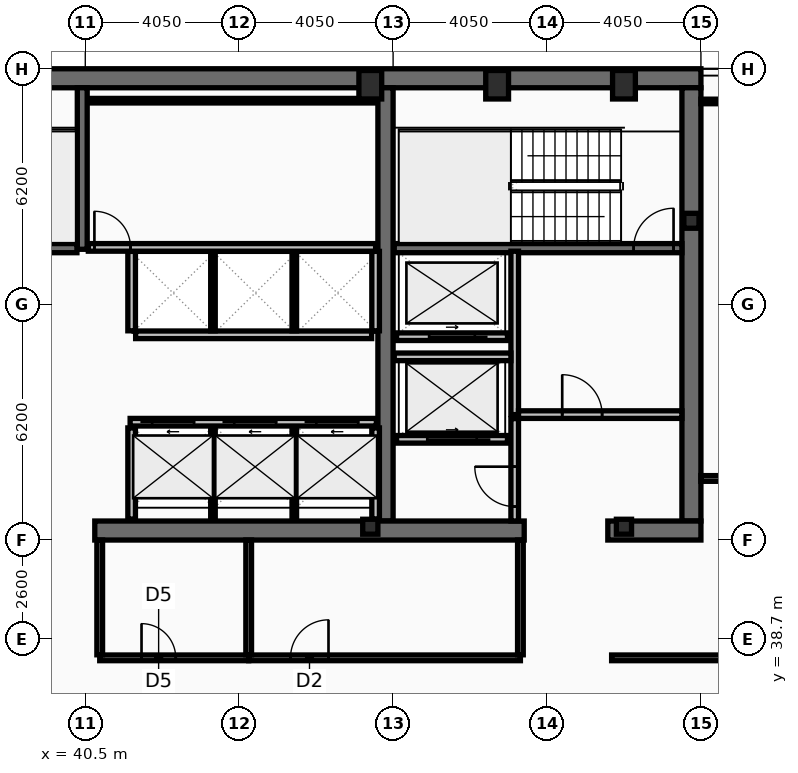
"""IFC4 building model, lengths in metres.
Left out: names, types, materials, properties, quantities, classifications, styles, units other than length and angle.
Written with IfcOpenShell. Run it as: python <this file> out.ifc"""

import sys

from ifc_helpers import new_model, si_unit, direction, frame, frame_2d, origin, origin_2d, place, context, subcontext, project, spatial, rectangle, hollow_rectangle, i_section, extrude, element, fill, save


model = new_model("IFC4")
c1 = context("Model", 3, precision=1e-05, world=origin(), true_north=direction((0.0, 1.0)))
c2 = subcontext(c1, "Body", "Model", "MODEL_VIEW")
j1 = project(units=[si_unit("LENGTHUNIT", "METRE"), si_unit("PLANEANGLEUNIT", "RADIAN")], contexts=[c1])
p1 = place(None, origin())
s1 = spatial("IfcSite", under=j1, at=p1, CompositionType="ELEMENT")
p2 = place(p1, origin())
s2 = spatial("IfcBuilding", under=s1, at=p2, CompositionType="ELEMENT")
p3 = place(p2, frame((0.0, 0.0, 269.8)))
s3 = spatial("IfcBuildingStorey", under=s2, at=p3, CompositionType="ELEMENT", Elevation=269.8)
p4 = place(p3, frame((16.2, 53.45, 0.0), z_axis=(0.0, 0.0, 1.0), x_axis=(1.0, 0.0, 0.0)))
e1 = element("IfcWall", 1, at=p4, inside=s3, PredefinedType="SHEAR", context=c2, shape_type="SweptSolid", body=[
    extrude(rectangle(XDim=40.5, YDim=0.5, at=frame_2d((20.25, 0.0))), origin(), (0.0, 0.0, 1.0), 3.44),
])
p5 = place(p3, frame((56.45, 53.2, 0.0), z_axis=(0.0, 0.0, 1.0), x_axis=(0.0, -1.0, 0.0)))
e2 = element("IfcWall", 2, at=p5, inside=s3, PredefinedType="SHEAR", context=c2, shape_type="SweptSolid", body=[
    extrude(rectangle(XDim=11.4, YDim=0.5, at=frame_2d((5.7, 0.0))), origin(), (0.0, 0.0, 1.0), 3.44),
])
p6 = place(p3, frame((48.4, 41.8, 0.0), z_axis=(0.0, 0.0, 1.0), x_axis=(0.0, 1.0, 0.0)))
e3 = element("IfcWall", 3, at=p6, inside=s3, PredefinedType="SHEAR", context=c2, shape_type="SweptSolid", body=[
    extrude(rectangle(XDim=11.4, YDim=0.4, at=frame_2d((5.7, 0.0))), origin(), (0.0, 0.0, 1.0), 3.44),
])
p7 = place(p3, frame((52.05, 41.55, 0.0), z_axis=(0.0, 0.0, 1.0), x_axis=(-1.0, 0.0, 0.0)))
e4 = element("IfcWall", 4, at=p7, inside=s3, PredefinedType="SHEAR", context=c2, shape_type="SweptSolid", body=[
    extrude(rectangle(XDim=11.3, YDim=0.5, at=frame_2d((5.65, 0.0))), origin(), (0.0, 0.0, 1.0), 3.44),
])
p8 = place(p3, frame((56.7, 41.55, 0.0), z_axis=(0.0, 0.0, 1.0), x_axis=(-1.0, 0.0, 0.0)))
e5 = element("IfcWall", 5, at=p8, inside=s3, PredefinedType="SHEAR", context=c2, shape_type="SweptSolid", body=[
    extrude(rectangle(XDim=2.45, YDim=0.5, at=frame_2d((1.225, 0.0))), origin(), (0.0, 0.0, 1.0), 3.44),
])
p9 = place(p3, frame((40.42, 48.95, 0.0), z_axis=(0.0, 0.0, 1.0), x_axis=(0.0, 1.0, 0.0)))
e6 = element("IfcWall", 6, at=p9, inside=s3, PredefinedType="SHEAR", context=c2, shape_type="SweptSolid", body=[
    extrude(rectangle(XDim=4.25, YDim=0.26, at=frame_2d((2.125, 0.0))), origin(), (0.0, 0.0, 1.0), 3.44),
])
p10 = place(p3, frame((48.63, 48.98, 0.0), z_axis=(0.0, 0.0, 1.0), x_axis=(1.0, 0.0, 0.0)))
e7 = element("IfcWall", 7, at=p10, inside=s3, PredefinedType="SHEAR", context=c2, shape_type="SweptSolid", body=[
    extrude(rectangle(XDim=7.57, YDim=0.24, at=frame_2d((3.785, 0.0))), origin(), (0.0, 0.0, 1.0), 3.44),
])
p11 = place(p10, frame((6.3, 0.0, 0.0)))
e8 = element("IfcOpeningElement", 8, at=p11, cuts=e7, PredefinedType="OPENING", context=c2, shape_type="SweptSolid", body=[
    extrude(rectangle(XDim=1.05, YDim=2.15, at=frame_2d((0.525, 1.075))), frame((0.0, 0.13, 0.0), z_axis=(0.0, -1.0, 0.0), x_axis=(1.0, 0.0, 0.0)), (0.0, 0.0, 1.0), 0.26),
])
p12 = place(p3, frame((32.72, 48.98, 0.0), z_axis=(0.0, 0.0, 1.0), x_axis=(1.0, 0.0, 0.0)))
e9 = element("IfcWall", 9, at=p12, inside=s3, PredefinedType="SHEAR", context=c2, shape_type="SweptSolid", body=[
    extrude(rectangle(XDim=7.56, YDim=0.24, at=frame_2d((3.78, 0.0))), origin(), (0.0, 0.0, 1.0), 3.44),
])
p13 = place(p12, frame((0.22, 0.0, 0.0)))
e10 = element("IfcOpeningElement", 10, at=p13, cuts=e9, PredefinedType="OPENING", context=c2, shape_type="SweptSolid", body=[
    extrude(rectangle(XDim=1.05, YDim=2.15, at=frame_2d((0.525, 1.075))), frame((0.0, 0.13, 0.0), z_axis=(0.0, -1.0, 0.0), x_axis=(1.0, 0.0, 0.0)), (0.0, 0.0, 1.0), 0.26),
])
for number, where, z_axis, x_axis in (
    (11, (48.0, 53.28, 0.0), (0.0, 0.0, 1.0), (1.0, 0.0, 0.0)),
    (12, (51.337, 53.28, 0.0), (0.0, 0.0, 1.0), (1.0, 0.0, 0.0)),
    (13, (54.675, 53.28, 0.0), (0.0, 0.0, 1.0), (1.0, 0.0, 0.0)),
):
    element("IfcColumn", number, at=place(p3, frame(where, z_axis=z_axis, x_axis=x_axis)), inside=s3, PredefinedType="COLUMN", context=c2, shape_type="SweptSolid", body=[
        extrude(hollow_rectangle(XDim=0.6, YDim=0.75, WallThickness=0.045, at=origin_2d()), origin(), (0.0, 0.0, 1.0), 3.6),
    ])
for number, where, z_axis, x_axis in (
    (14, (56.45, 49.7, 0.0), (0.0, 0.0, 1.0), (1.0, 0.0, 0.0)),
    (15, (48.0, 41.65, 0.0), (0.0, 0.0, 1.0), (1.0, 0.0, 0.0)),
    (16, (54.675, 41.65, 0.0), (0.0, 0.0, 1.0), (1.0, 0.0, 0.0)),
):
    element("IfcColumn", number, at=place(p3, frame(where, z_axis=z_axis, x_axis=x_axis)), inside=s3, PredefinedType="COLUMN", context=c2, shape_type="SweptSolid", body=[
        extrude(i_section(OverallWidth=0.399, OverallDepth=0.393, WebThickness=0.023, FlangeThickness=0.037, at=origin_2d()), origin(), (0.0, 0.0, 1.0), 3.6),
    ])
p14 = place(p3, frame((41.68, 44.4, 0.0), z_axis=(0.0, 0.0, 1.0), x_axis=(1.0, 0.0, 0.0)))
e17 = element("IfcWall", 17, at=p14, inside=s3, PredefinedType="PARTITIONING", context=c2, shape_type="SweptSolid", body=[
    extrude(rectangle(XDim=6.48, YDim=0.2, at=frame_2d((3.24, 0.0))), origin(), (0.0, 0.0, 1.0), 3.44),
])
p15 = place(p14, frame((0.58, 0.0, 0.0)))
e18 = element("IfcOpeningElement", 18, at=p15, cuts=e17, PredefinedType="OPENING", context=c2, shape_type="SweptSolid", body=[
    extrude(rectangle(XDim=1.1, YDim=2.18, at=frame_2d((0.55, 1.09))), frame((0.0, 0.11, 0.0), z_axis=(0.0, -1.0, 0.0), x_axis=(1.0, 0.0, 0.0)), (0.0, 0.0, 1.0), 0.22),
])
p16 = place(p14, frame((2.74, 0.0, 0.0)))
e19 = element("IfcOpeningElement", 19, at=p16, cuts=e17, PredefinedType="OPENING", context=c2, shape_type="SweptSolid", body=[
    extrude(rectangle(XDim=1.1, YDim=2.18, at=frame_2d((0.55, 1.09))), frame((0.0, 0.11, 0.0), z_axis=(0.0, -1.0, 0.0), x_axis=(1.0, 0.0, 0.0)), (0.0, 0.0, 1.0), 0.22),
])
p17 = place(p14, frame((4.9, 0.0, 0.0)))
e20 = element("IfcOpeningElement", 20, at=p17, cuts=e17, PredefinedType="OPENING", context=c2, shape_type="SweptSolid", body=[
    extrude(rectangle(XDim=1.1, YDim=2.18, at=frame_2d((0.55, 1.09))), frame((0.0, 0.11, 0.0), z_axis=(0.0, -1.0, 0.0), x_axis=(1.0, 0.0, 0.0)), (0.0, 0.0, 1.0), 0.22),
])
p18 = place(p3, frame((51.61, 43.95, 0.0), z_axis=(0.0, 0.0, 1.0), x_axis=(-1.0, 0.0, 0.0)))
e21 = element("IfcWall", 21, at=p18, inside=s3, PredefinedType="PARTITIONING", context=c2, shape_type="SweptSolid", body=[
    extrude(rectangle(XDim=2.92, YDim=0.2, at=frame_2d((1.46, 0.0))), origin(), (0.0, 0.0, 1.0), 3.44),
])
p19 = place(p18, frame((0.81, 0.0, 0.0)))
e22 = element("IfcOpeningElement", 22, at=p19, cuts=e21, PredefinedType="OPENING", context=c2, shape_type="SweptSolid", body=[
    extrude(rectangle(XDim=1.3, YDim=2.18, at=frame_2d((0.65, 1.09))), frame((0.0, 0.11, 0.0), z_axis=(0.0, -1.0, 0.0), x_axis=(1.0, 0.0, 0.0)), (0.0, 0.0, 1.0), 0.22),
])
p20 = place(p3, frame((51.61, 46.65, 0.0), z_axis=(0.0, 0.0, 1.0), x_axis=(-1.0, 0.0, 0.0)))
e23 = element("IfcWall", 23, at=p20, inside=s3, PredefinedType="PARTITIONING", context=c2, shape_type="SweptSolid", body=[
    extrude(rectangle(XDim=2.92, YDim=0.2, at=frame_2d((1.46, 0.0))), origin(), (0.0, 0.0, 1.0), 3.44),
])
p21 = place(p20, frame((0.86, 0.0, 0.0)))
e24 = element("IfcOpeningElement", 24, at=p21, cuts=e23, PredefinedType="OPENING", context=c2, shape_type="SweptSolid", body=[
    extrude(rectangle(XDim=1.2, YDim=2.18, at=frame_2d((0.6, 1.09))), frame((0.0, 0.11, 0.0), z_axis=(0.0, -1.0, 0.0), x_axis=(1.0, 0.0, 0.0)), (0.0, 0.0, 1.0), 0.22),
])
p22 = place(p3, frame((51.8, 44.6, 0.0), z_axis=(0.0, 0.0, 1.0), x_axis=(0.0, 1.0, 0.0)))
e25 = element("IfcWall", 25, at=p22, inside=s3, PredefinedType="PARTITIONING", context=c2, shape_type="SweptSolid", body=[
    extrude(rectangle(XDim=4.3, YDim=0.2, at=frame_2d((2.15, 0.0))), origin(), (0.0, 0.0, 1.0), 3.44),
])
p23 = place(p3, frame((51.9, 44.6, 0.0), z_axis=(0.0, 0.0, 1.0), x_axis=(1.0, 0.0, 0.0)))
e26 = element("IfcWall", 26, at=p23, inside=s3, PredefinedType="PARTITIONING", context=c2, shape_type="SweptSolid", body=[
    extrude(rectangle(XDim=4.3, YDim=0.2, at=frame_2d((2.15, 0.0))), origin(), (0.0, 0.0, 1.0), 3.44),
])
p24 = place(p23, frame((1.15, 0.0, 0.0)))
e27 = element("IfcOpeningElement", 27, at=p24, cuts=e26, PredefinedType="OPENING", context=c2, shape_type="SweptSolid", body=[
    extrude(rectangle(XDim=1.05, YDim=2.15, at=frame_2d((0.525, 1.075))), frame((0.0, 0.11, 0.0), z_axis=(0.0, -1.0, 0.0), x_axis=(1.0, 0.0, 0.0)), (0.0, 0.0, 1.0), 0.22),
])
p25 = place(p3, frame((48.63, 46.12, 0.0), z_axis=(0.0, 0.0, 1.0), x_axis=(1.0, 0.0, 0.0)))
e28 = element("IfcWall", 28, at=p25, inside=s3, PredefinedType="PARTITIONING", context=c2, shape_type="SweptSolid", body=[
    extrude(rectangle(XDim=3.07, YDim=0.2, at=frame_2d((1.535, 0.0))), origin(), (0.0, 0.0, 1.0), 3.44),
])
p26 = place(p3, frame((51.8, 41.8, 0.0), z_axis=(0.0, 0.0, 1.0), x_axis=(0.0, 1.0, 0.0)))
e29 = element("IfcWall", 29, at=p26, inside=s3, PredefinedType="PARTITIONING", context=c2, shape_type="SweptSolid", body=[
    extrude(rectangle(XDim=2.695, YDim=0.2, at=frame_2d((1.348, 0.0))), origin(), (0.0, 0.0, 1.0), 3.44),
])
p27 = place(p26, frame((0.38, 0.0, 0.0)))
e30 = element("IfcOpeningElement", 30, at=p27, cuts=e29, PredefinedType="OPENING", context=c2, shape_type="SweptSolid", body=[
    extrude(rectangle(XDim=1.05, YDim=2.15, at=frame_2d((0.525, 1.075))), frame((0.0, 0.11, 0.0), z_axis=(0.0, -1.0, 0.0), x_axis=(1.0, 0.0, 0.0)), (0.0, 0.0, 1.0), 0.22),
])
p28 = place(p3, frame((41.825, 46.7, 0.0), z_axis=(0.0, 0.0, 1.0), x_axis=(1.0, 0.0, 0.0)))
e31 = element("IfcWall", 31, at=p28, inside=s3, PredefinedType="PARTITIONING", context=c2, shape_type="SweptSolid", body=[
    extrude(rectangle(XDim=6.21, YDim=0.2, at=frame_2d((3.105, 0.0))), origin(), (0.0, 0.0, 1.0), 3.44),
])
for number, where, z_axis, x_axis in (
    (32, (41.72, 46.805, 0.0), (0.0, 0.0, 1.0), (0.0, 1.0, 0.0)),
    (33, (48.14, 46.805, 0.0), (0.0, 0.0, 1.0), (0.0, 1.0, 0.0)),
):
    element("IfcWall", number, at=place(p3, frame(where, z_axis=z_axis, x_axis=x_axis)), inside=s3, PredefinedType="PARTITIONING", context=c2, shape_type="SweptSolid", body=[
        extrude(rectangle(XDim=2.09, YDim=0.2, at=frame_2d((1.045, 0.0))), origin(), (0.0, 0.0, 1.0), 3.44),
    ])
for number, where, z_axis, x_axis in (
    (34, (43.86, 46.805, 0.0), (0.0, 0.0, 1.0), (0.0, 1.0, 0.0)),
    (35, (46.0, 46.805, 0.0), (0.0, 0.0, 1.0), (0.0, 1.0, 0.0)),
):
    element("IfcWall", number, at=place(p3, frame(where, z_axis=z_axis, x_axis=x_axis)), inside=s3, PredefinedType="PARTITIONING", context=c2, shape_type="SweptSolid", body=[
        extrude(rectangle(XDim=2.09, YDim=0.12, at=frame_2d((1.045, 0.0))), origin(), (0.0, 0.0, 1.0), 3.44),
    ])
for number, where, z_axis, x_axis in (
    (36, (41.72, 41.85, 0.0), (0.0, 0.0, 1.0), (0.0, 1.0, 0.0)),
    (37, (48.14, 41.85, 0.0), (0.0, 0.0, 1.0), (0.0, 1.0, 0.0)),
):
    element("IfcWall", number, at=place(p3, frame(where, z_axis=z_axis, x_axis=x_axis)), inside=s3, PredefinedType="PARTITIONING", context=c2, shape_type="SweptSolid", body=[
        extrude(rectangle(XDim=2.4, YDim=0.2, at=frame_2d((1.2, 0.0))), origin(), (0.0, 0.0, 1.0), 3.44),
    ])
for number, where, z_axis, x_axis in (
    (38, (43.86, 41.85, 0.0), (0.0, 0.0, 1.0), (0.0, 1.0, 0.0)),
    (39, (46.0, 41.85, 0.0), (0.0, 0.0, 1.0), (0.0, 1.0, 0.0)),
):
    element("IfcWall", number, at=place(p3, frame(where, z_axis=z_axis, x_axis=x_axis)), inside=s3, PredefinedType="PARTITIONING", context=c2, shape_type="SweptSolid", body=[
        extrude(rectangle(XDim=2.4, YDim=0.12, at=frame_2d((1.2, 0.0))), origin(), (0.0, 0.0, 1.0), 3.44),
    ])
p29 = place(p3, frame((40.58, 52.86, 0.0), z_axis=(0.0, 0.0, 1.0), x_axis=(1.0, 0.0, 0.0)))
e40 = element("IfcWall", 40, at=p29, inside=s3, PredefinedType="PARTITIONING", context=c2, shape_type="SweptSolid", body=[
    extrude(rectangle(XDim=7.56, YDim=0.12, at=frame_2d((3.78, 0.0))), origin(), (0.0, 0.0, 1.0), 3.44),
])
p30 = place(p3, frame((40.58, 49.0, 0.0), z_axis=(0.0, 0.0, 1.0), x_axis=(1.0, 0.0, 0.0)))
e41 = element("IfcWall", 41, at=p30, inside=s3, PredefinedType="PARTITIONING", context=c2, shape_type="SweptSolid", body=[
    extrude(rectangle(XDim=7.56, YDim=0.2, at=frame_2d((3.78, 0.0))), origin(), (0.0, 0.0, 1.0), 3.44),
])
p31 = place(p30, frame((0.16, 0.0, 0.0)))
e42 = element("IfcOpeningElement", 42, at=p31, cuts=e41, PredefinedType="OPENING", context=c2, shape_type="SweptSolid", body=[
    extrude(rectangle(XDim=0.95, YDim=2.1, at=frame_2d((0.475, 1.05))), frame((0.0, 0.11, 0.0), z_axis=(0.0, -1.0, 0.0), x_axis=(1.0, 0.0, 0.0)), (0.0, 0.0, 1.0), 0.22),
])
p32 = place(p3, frame((40.88, 38.2, 0.0), z_axis=(0.0, 0.0, 1.0), x_axis=(1.0, 0.0, 0.0)))
e43 = element("IfcWall", 43, at=p32, inside=s3, PredefinedType="PARTITIONING", context=c2, shape_type="SweptSolid", body=[
    extrude(rectangle(XDim=3.92, YDim=0.15, at=frame_2d((1.96, 0.0))), origin(), (0.0, 0.0, 1.0), 2.78),
])
p33 = place(p32, frame((1.1, 0.0, 0.0)))
e44 = element("IfcOpeningElement", 44, at=p33, cuts=e43, PredefinedType="OPENING", context=c2, shape_type="SweptSolid", body=[
    extrude(rectangle(XDim=0.9, YDim=2.05, at=frame_2d((0.45, 1.025))), frame((0.0, 0.085, 0.0), z_axis=(0.0, -1.0, 0.0), x_axis=(1.0, 0.0, 0.0)), (0.0, 0.0, 1.0), 0.17),
])
p34 = place(p3, frame((44.8, 38.2, 0.0), z_axis=(0.0, 0.0, 1.0), x_axis=(1.0, 0.0, 0.0)))
e45 = element("IfcWall", 45, at=p34, inside=s3, PredefinedType="PARTITIONING", context=c2, shape_type="SweptSolid", body=[
    extrude(rectangle(XDim=7.15, YDim=0.15, at=frame_2d((3.575, 0.0))), origin(), (0.0, 0.0, 1.0), 2.78),
])
p35 = place(p34, frame((1.1, 0.0, 0.0)))
e46 = element("IfcOpeningElement", 46, at=p35, cuts=e45, PredefinedType="OPENING", context=c2, shape_type="SweptSolid", body=[
    extrude(rectangle(XDim=1.0, YDim=2.05, at=frame_2d((0.5, 1.025))), frame((0.0, 0.085, 0.0), z_axis=(0.0, -1.0, 0.0), x_axis=(1.0, 0.0, 0.0)), (0.0, 0.0, 1.0), 0.17),
])
for number, where, z_axis, x_axis in (
    (47, (40.88, 38.28, 0.0), (0.0, 0.0, 1.0), (0.0, 1.0, 0.0)),
    (48, (44.8, 38.28, 0.0), (0.0, 0.0, 1.0), (0.0, 1.0, 0.0)),
    (49, (51.95, 38.28, 0.0), (0.0, 0.0, 1.0), (0.0, 1.0, 0.0)),
):
    element("IfcWall", number, at=place(p3, frame(where, z_axis=z_axis, x_axis=x_axis)), inside=s3, PredefinedType="PARTITIONING", context=c2, shape_type="SweptSolid", body=[
        extrude(rectangle(XDim=3.02, YDim=0.15, at=frame_2d((1.51, 0.0))), origin(), (0.0, 0.0, 1.0), 3.44),
    ])
p36 = place(p3, frame((54.35, 38.2, 0.0), z_axis=(0.0, 0.0, 1.0), x_axis=(1.0, 0.0, 0.0)))
e50 = element("IfcWall", 50, at=p36, inside=s3, PredefinedType="PARTITIONING", context=c2, shape_type="SweptSolid", body=[
    extrude(rectangle(XDim=8.52, YDim=0.15, at=frame_2d((4.26, 0.0))), origin(), (0.0, 0.0, 1.0), 2.78),
])
p37 = place(p36, frame((3.25, 0.0, 0.0)))
e51 = element("IfcOpeningElement", 51, at=p37, cuts=e50, PredefinedType="OPENING", context=c2, shape_type="SweptSolid", body=[
    extrude(rectangle(XDim=0.95, YDim=2.05, at=frame_2d((0.475, 1.025))), frame((0.0, 0.085, 0.0), z_axis=(0.0, -1.0, 0.0), x_axis=(1.0, 0.0, 0.0)), (0.0, 0.0, 1.0), 0.17),
])
p38 = place(p3, frame((56.7, 42.92, 0.0), z_axis=(0.0, 0.0, 1.0), x_axis=(1.0, 0.0, 0.0)))
e52 = element("IfcWall", 52, at=p38, inside=s3, PredefinedType="PARTITIONING", context=c2, shape_type="SweptSolid", body=[
    extrude(rectangle(XDim=6.105, YDim=0.15, at=frame_2d((3.052, 0.0))), origin(), (0.0, 0.0, 1.0), 2.78),
])
p39 = place(p38, frame((0.9, 0.0, 0.0)))
e53 = element("IfcOpeningElement", 53, at=p39, cuts=e52, PredefinedType="OPENING", context=c2, shape_type="SweptSolid", body=[
    extrude(rectangle(XDim=0.9, YDim=2.05, at=frame_2d((0.45, 1.025))), frame((0.0, 0.085, 0.0), z_axis=(0.0, -1.0, 0.0), x_axis=(1.0, 0.0, 0.0)), (0.0, 0.0, 1.0), 0.17),
])
p40 = place(p3, frame((56.7, 52.84, 0.0), z_axis=(0.0, 0.0, 1.0), x_axis=(1.0, 0.0, 0.0)))
e54 = element("IfcWall", 54, at=p40, inside=s3, PredefinedType="PARTITIONING", context=c2, shape_type="SweptSolid", body=[
    extrude(rectangle(XDim=6.105, YDim=0.12, at=frame_2d((3.052, 0.0))), origin(), (0.0, 0.0, 1.0), 3.44),
])
p41 = place(p11, origin())
e55 = element("IfcDoor", 55, at=p41, inside=s3, OperationType="SINGLE_SWING_RIGHT", PredefinedType="DOOR", context=c2, shape_type="SweptSolid", body=[
    extrude(rectangle(XDim=1.05, YDim=2.15, at=frame_2d((0.525, 1.075))), frame((0.0, 0.025, 0.0), z_axis=(0.0, -1.0, 0.0), x_axis=(1.0, 0.0, 0.0)), (0.0, 0.0, 1.0), 0.05),
])
fill(e8, e55)
p42 = place(p15, origin())
e56 = element("IfcDoor", 56, at=p42, inside=s3, OperationType="SLIDING_TO_LEFT", PredefinedType="DOOR", context=c2, shape_type="SweptSolid", body=[
    extrude(rectangle(XDim=1.1, YDim=2.18, at=frame_2d((0.55, 1.09))), frame((0.0, 0.025, 0.0), z_axis=(0.0, -1.0, 0.0), x_axis=(1.0, 0.0, 0.0)), (0.0, 0.0, 1.0), 0.05),
])
fill(e18, e56)
p43 = place(p16, origin())
e57 = element("IfcDoor", 57, at=p43, inside=s3, OperationType="SLIDING_TO_LEFT", PredefinedType="DOOR", context=c2, shape_type="SweptSolid", body=[
    extrude(rectangle(XDim=1.1, YDim=2.18, at=frame_2d((0.55, 1.09))), frame((0.0, 0.025, 0.0), z_axis=(0.0, -1.0, 0.0), x_axis=(1.0, 0.0, 0.0)), (0.0, 0.0, 1.0), 0.05),
])
fill(e19, e57)
p44 = place(p17, origin())
e58 = element("IfcDoor", 58, at=p44, inside=s3, OperationType="SLIDING_TO_LEFT", PredefinedType="DOOR", context=c2, shape_type="SweptSolid", body=[
    extrude(rectangle(XDim=1.1, YDim=2.18, at=frame_2d((0.55, 1.09))), frame((0.0, 0.025, 0.0), z_axis=(0.0, -1.0, 0.0), x_axis=(1.0, 0.0, 0.0)), (0.0, 0.0, 1.0), 0.05),
])
fill(e20, e58)
p45 = place(p19, origin())
e59 = element("IfcDoor", 59, at=p45, inside=s3, OperationType="SLIDING_TO_LEFT", PredefinedType="DOOR", context=c2, shape_type="SweptSolid", body=[
    extrude(rectangle(XDim=1.3, YDim=2.18, at=frame_2d((0.65, 1.09))), frame((0.0, 0.025, 0.0), z_axis=(0.0, -1.0, 0.0), x_axis=(1.0, 0.0, 0.0)), (0.0, 0.0, 1.0), 0.05),
])
fill(e22, e59)
p46 = place(p21, origin())
e60 = element("IfcDoor", 60, at=p46, inside=s3, OperationType="SLIDING_TO_LEFT", PredefinedType="DOOR", context=c2, shape_type="SweptSolid", body=[
    extrude(rectangle(XDim=1.2, YDim=2.18, at=frame_2d((0.6, 1.09))), frame((0.0, 0.025, 0.0), z_axis=(0.0, -1.0, 0.0), x_axis=(1.0, 0.0, 0.0)), (0.0, 0.0, 1.0), 0.05),
])
fill(e24, e60)
p47 = place(p24, origin())
e61 = element("IfcDoor", 61, at=p47, inside=s3, OperationType="SINGLE_SWING_LEFT", PredefinedType="DOOR", context=c2, shape_type="SweptSolid", body=[
    extrude(rectangle(XDim=1.05, YDim=2.15, at=frame_2d((0.525, 1.075))), frame((0.0, 0.025, 0.0), z_axis=(0.0, -1.0, 0.0), x_axis=(1.0, 0.0, 0.0)), (0.0, 0.0, 1.0), 0.05),
])
fill(e27, e61)
p48 = place(p27, origin())
e62 = element("IfcDoor", 62, at=p48, inside=s3, OperationType="SINGLE_SWING_RIGHT", PredefinedType="DOOR", context=c2, shape_type="SweptSolid", body=[
    extrude(rectangle(XDim=1.05, YDim=2.15, at=frame_2d((0.525, 1.075))), frame((0.0, 0.025, 0.0), z_axis=(0.0, -1.0, 0.0), x_axis=(1.0, 0.0, 0.0)), (0.0, 0.0, 1.0), 0.05),
])
fill(e30, e62)
p49 = place(p31, origin())
e63 = element("IfcDoor", 63, at=p49, inside=s3, OperationType="SINGLE_SWING_LEFT", PredefinedType="DOOR", context=c2, shape_type="SweptSolid", body=[
    extrude(rectangle(XDim=0.95, YDim=2.1, at=frame_2d((0.475, 1.05))), frame((0.0, 0.025, 0.0), z_axis=(0.0, -1.0, 0.0), x_axis=(1.0, 0.0, 0.0)), (0.0, 0.0, 1.0), 0.05),
])
fill(e42, e63)
p50 = place(p33, origin())
e64 = element("IfcDoor", 64, at=p50, inside=s3, OperationType="SINGLE_SWING_LEFT", PredefinedType="DOOR", context=c2, shape_type="SweptSolid", body=[
    extrude(rectangle(XDim=0.9, YDim=2.05, at=frame_2d((0.45, 1.025))), frame((0.0, 0.025, 0.0), z_axis=(0.0, -1.0, 0.0), x_axis=(1.0, 0.0, 0.0)), (0.0, 0.0, 1.0), 0.05),
])
fill(e44, e64)
p51 = place(p35, origin())
e65 = element("IfcDoor", 65, at=p51, inside=s3, OperationType="SINGLE_SWING_RIGHT", PredefinedType="DOOR", context=c2, shape_type="SweptSolid", body=[
    extrude(rectangle(XDim=1.0, YDim=2.05, at=frame_2d((0.5, 1.025))), frame((0.0, 0.025, 0.0), z_axis=(0.0, -1.0, 0.0), x_axis=(1.0, 0.0, 0.0)), (0.0, 0.0, 1.0), 0.05),
])
fill(e46, e65)
save(model, sys.argv[1])
